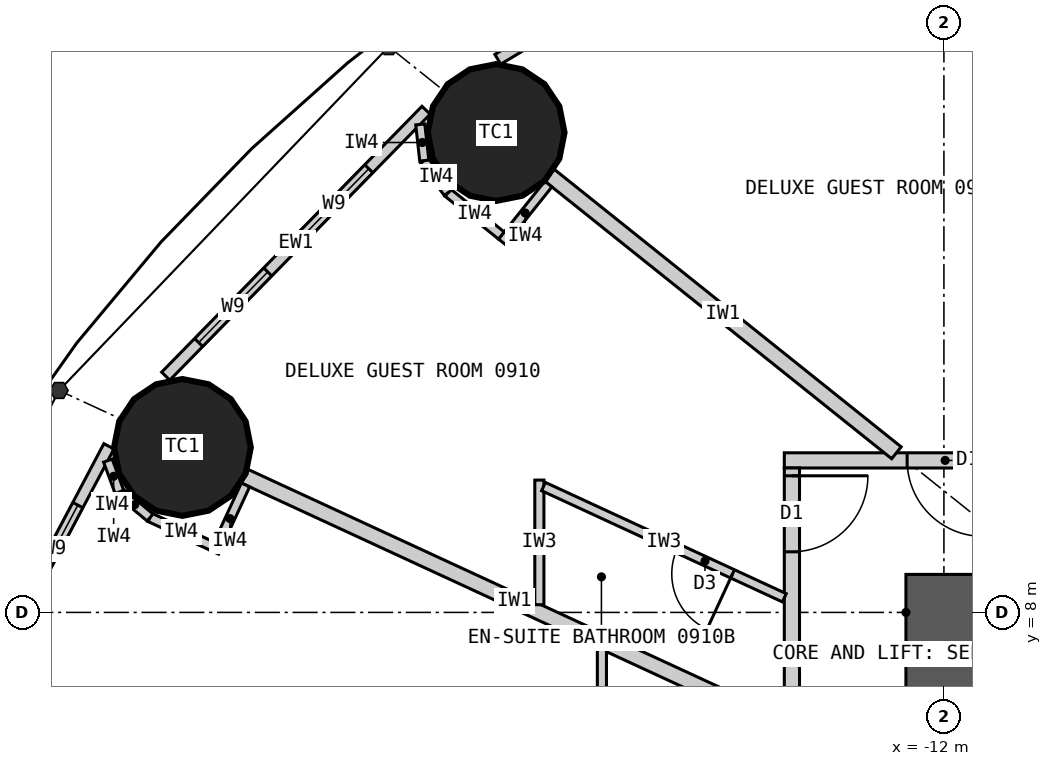
"""IFC4 building model, lengths in metres.
Left out: names, types, materials, properties, quantities, classifications, styles, units other than length and angle.
Written with IfcOpenShell. Run it as: python <this file> out.ifc"""

import sys

from ifc_helpers import new_model, si_unit, direction, frame, frame_2d, origin, origin_2d, place, context, subcontext, project, spatial, rectangle, circle, extrude, element, fill, save


model = new_model("IFC4")
c1 = context("Model", 3, precision=1e-05, world=origin(), true_north=direction((0.0, 1.0)))
c2 = subcontext(c1, "Body", "Model", "MODEL_VIEW")
j1 = project(units=[si_unit("LENGTHUNIT", "METRE"), si_unit("PLANEANGLEUNIT", "RADIAN")], contexts=[c1])
p1 = place(None, origin())
s1 = spatial("IfcSite", under=j1, at=p1, CompositionType="ELEMENT")
p2 = place(p1, origin())
s2 = spatial("IfcBuilding", under=s1, at=p2, CompositionType="ELEMENT")
p3 = place(p2, frame((0.0, 0.0, 42.6)))
s3 = spatial("IfcBuildingStorey", under=s2, at=p3, CompositionType="ELEMENT", Elevation=42.6)
for number, where, z_axis, x_axis in (
    (1, (-17.892, 14.313, 0.0), (0.0, 0.0, 1.0), (1.0, 0.0, 0.0)),
    (2, (-22.019, 10.17, 0.0), (0.0, 0.0, 1.0), (1.0, 0.0, 0.0)),
):
    element("IfcColumn", number, at=place(p3, frame(where, z_axis=z_axis, x_axis=x_axis)), inside=s3, PredefinedType="COLUMN", context=c2, shape_type="SweptSolid", body=[
        extrude(circle(Radius=0.9, at=origin_2d()), origin(), (0.0, 0.0, 1.0), 3.3),
    ])
p4 = place(p3, frame((-12.5, 8.0, 0.0), z_axis=(0.0, 0.0, 1.0), x_axis=(1.0, 0.0, 0.0)))
e3 = element("IfcWall", 3, at=p4, inside=s3, PredefinedType="SHEAR", context=c2, shape_type="SweptSolid", body=[
    extrude(rectangle(XDim=25.0, YDim=1.0, at=frame_2d((12.5, 0.0))), origin(), (0.0, 0.0, 1.0), 3.3),
])
p5 = place(p4, frame((11.2, 0.0, 0.0)))
e4 = element("IfcOpeningElement", 4, at=p5, cuts=e3, PredefinedType="OPENING", context=c2, shape_type="SweptSolid", body=[
    extrude(rectangle(XDim=1.2, YDim=2.2, at=frame_2d((0.6, 1.1))), frame((0.0, 0.51, 0.0), z_axis=(0.0, -1.0, 0.0), x_axis=(1.0, 0.0, 0.0)), (0.0, 0.0, 1.0), 1.02),
])
p6 = place(p4, frame((18.8, 0.0, 0.0)))
e5 = element("IfcOpeningElement", 5, at=p6, cuts=e3, PredefinedType="OPENING", context=c2, shape_type="SweptSolid", body=[
    extrude(rectangle(XDim=0.9, YDim=2.2, at=frame_2d((0.45, 1.1))), frame((0.0, 0.51, 0.0), z_axis=(0.0, -1.0, 0.0), x_axis=(1.0, 0.0, 0.0)), (0.0, 0.0, 1.0), 1.02),
])
p7 = place(p3, frame((-12.0, 7.5, 0.0), z_axis=(0.0, 0.0, 1.0), x_axis=(0.0, -1.0, 0.0)))
e6 = element("IfcWall", 6, at=p7, inside=s3, PredefinedType="SHEAR", context=c2, shape_type="SweptSolid", body=[
    extrude(rectangle(XDim=15.0, YDim=1.0, at=frame_2d((7.5, 0.0))), origin(), (0.0, 0.0, 1.0), 3.3),
])
p8 = place(p7, frame((6.6, 0.0, 0.0)))
e7 = element("IfcOpeningElement", 7, at=p8, cuts=e6, PredefinedType="OPENING", context=c2, shape_type="SweptSolid", body=[
    extrude(rectangle(XDim=1.8, YDim=2.2, at=frame_2d((0.9, 1.1))), frame((0.0, 0.51, 0.0), z_axis=(0.0, -1.0, 0.0), x_axis=(1.0, 0.0, 0.0)), (0.0, 0.0, 1.0), 1.02),
])
p9 = place(p3, frame((-13.412, 17.957, 0.0), z_axis=(0.0, 0.0, 1.0), x_axis=(-0.856958191554, -0.515385931054, 0.0)))
e8 = element("IfcWall", 8, at=p9, inside=s3, PredefinedType="ELEMENTEDWALL", context=c2, shape_type="SweptSolid", body=[
    extrude(rectangle(XDim=5.201, YDim=0.15, at=frame_2d((2.601, 0.0))), origin(), (0.0, 0.0, 1.0), 3.05),
])
p10 = place(p9, frame((1.225, 0.0, 0.9)))
e9 = element("IfcOpeningElement", 9, at=p10, cuts=e8, PredefinedType="OPENING", context=c2, shape_type="SweptSolid", body=[
    extrude(rectangle(XDim=1.3, YDim=1.9, at=frame_2d((0.65, 0.95))), frame((0.0, 0.085, 0.0), z_axis=(0.0, -1.0, 0.0), x_axis=(1.0, 0.0, 0.0)), (0.0, 0.0, 1.0), 0.17),
])
p11 = place(p9, frame((3.125, 0.0, 0.9)))
e10 = element("IfcOpeningElement", 10, at=p11, cuts=e8, PredefinedType="OPENING", context=c2, shape_type="SweptSolid", body=[
    extrude(rectangle(XDim=1.3, YDim=1.9, at=frame_2d((0.65, 0.95))), frame((0.0, 0.085, 0.0), z_axis=(0.0, -1.0, 0.0), x_axis=(1.0, 0.0, 0.0)), (0.0, 0.0, 1.0), 0.17),
])
p12 = place(p3, frame((-18.813, 14.607, 0.0), z_axis=(0.0, 0.0, 1.0), x_axis=(-0.699612594083, -0.714522370679, 0.0)))
e11 = element("IfcWall", 11, at=p12, inside=s3, PredefinedType="ELEMENTEDWALL", context=c2, shape_type="SweptSolid", body=[
    extrude(rectangle(XDim=4.896, YDim=0.15, at=frame_2d((2.448, 0.0))), origin(), (0.0, 0.0, 1.0), 3.05),
])
p13 = place(p12, frame((1.077, 0.0, 0.9)))
e12 = element("IfcOpeningElement", 12, at=p13, cuts=e11, PredefinedType="OPENING", context=c2, shape_type="SweptSolid", body=[
    extrude(rectangle(XDim=1.3, YDim=1.9, at=frame_2d((0.65, 0.95))), frame((0.0, 0.085, 0.0), z_axis=(0.0, -1.0, 0.0), x_axis=(1.0, 0.0, 0.0)), (0.0, 0.0, 1.0), 0.17),
])
p14 = place(p12, frame((2.977, 0.0, 0.9)))
e13 = element("IfcOpeningElement", 13, at=p14, cuts=e11, PredefinedType="OPENING", context=c2, shape_type="SweptSolid", body=[
    extrude(rectangle(XDim=1.3, YDim=1.9, at=frame_2d((0.65, 0.95))), frame((0.0, 0.085, 0.0), z_axis=(0.0, -1.0, 0.0), x_axis=(1.0, 0.0, 0.0)), (0.0, 0.0, 1.0), 0.17),
])
p15 = place(p3, frame((-22.986, 10.185, 0.0), z_axis=(0.0, 0.0, 1.0), x_axis=(-0.467303182954, -0.884097129959, 0.0)))
e14 = element("IfcWall", 14, at=p15, inside=s3, PredefinedType="ELEMENTEDWALL", context=c2, shape_type="SweptSolid", body=[
    extrude(rectangle(XDim=4.606, YDim=0.15, at=frame_2d((2.303, 0.0))), origin(), (0.0, 0.0, 1.0), 3.05),
])
p16 = place(p15, frame((0.875, 0.0, 0.9)))
e15 = element("IfcOpeningElement", 15, at=p16, cuts=e14, PredefinedType="OPENING", context=c2, shape_type="SweptSolid", body=[
    extrude(rectangle(XDim=1.3, YDim=1.9, at=frame_2d((0.65, 0.95))), frame((0.0, 0.085, 0.0), z_axis=(0.0, -1.0, 0.0), x_axis=(1.0, 0.0, 0.0)), (0.0, 0.0, 1.0), 0.17),
])
p17 = place(p15, frame((2.775, 0.0, 0.9)))
e16 = element("IfcOpeningElement", 16, at=p17, cuts=e14, PredefinedType="OPENING", context=c2, shape_type="SweptSolid", body=[
    extrude(rectangle(XDim=1.3, YDim=1.9, at=frame_2d((0.65, 0.95))), frame((0.0, 0.085, 0.0), z_axis=(0.0, -1.0, 0.0), x_axis=(1.0, 0.0, 0.0)), (0.0, 0.0, 1.0), 0.17),
])
p18 = place(p3, frame((-14.1, 10.0, 0.0), z_axis=(0.0, 0.0, 1.0), x_axis=(1.0, 0.0, 0.0)))
e17 = element("IfcWall", 17, at=p18, inside=s3, PredefinedType="PARTITIONING", context=c2, shape_type="SweptSolid", body=[
    extrude(rectangle(XDim=28.2, YDim=0.2, at=frame_2d((14.1, 0.0))), origin(), (0.0, 0.0, 1.0), 3.05),
])
p19 = place(p18, frame((23.477, 0.0, 0.0)))
e18 = element("IfcOpeningElement", 18, at=p19, cuts=e17, PredefinedType="OPENING", context=c2, shape_type="SweptSolid", body=[
    extrude(rectangle(XDim=1.0, YDim=2.2, at=frame_2d((0.5, 1.1))), frame((0.0, 0.11, 0.0), z_axis=(0.0, -1.0, 0.0), x_axis=(1.0, 0.0, 0.0)), (0.0, 0.0, 1.0), 0.22),
])
p20 = place(p18, frame((18.529, 0.0, 0.0)))
e19 = element("IfcOpeningElement", 19, at=p20, cuts=e17, PredefinedType="OPENING", context=c2, shape_type="SweptSolid", body=[
    extrude(rectangle(XDim=1.0, YDim=2.2, at=frame_2d((0.5, 1.1))), frame((0.0, 0.11, 0.0), z_axis=(0.0, -1.0, 0.0), x_axis=(1.0, 0.0, 0.0)), (0.0, 0.0, 1.0), 0.22),
])
p21 = place(p18, frame((14.623, 0.0, 0.0)))
e20 = element("IfcOpeningElement", 20, at=p21, cuts=e17, PredefinedType="OPENING", context=c2, shape_type="SweptSolid", body=[
    extrude(rectangle(XDim=1.0, YDim=2.2, at=frame_2d((0.5, 1.1))), frame((0.0, 0.11, 0.0), z_axis=(0.0, -1.0, 0.0), x_axis=(1.0, 0.0, 0.0)), (0.0, 0.0, 1.0), 0.22),
])
p22 = place(p18, frame((11.252, 0.0, 0.0)))
e21 = element("IfcOpeningElement", 21, at=p22, cuts=e17, PredefinedType="OPENING", context=c2, shape_type="SweptSolid", body=[
    extrude(rectangle(XDim=1.0, YDim=2.1, at=frame_2d((0.5, 1.05))), frame((0.0, 0.11, 0.0), z_axis=(0.0, -1.0, 0.0), x_axis=(1.0, 0.0, 0.0)), (0.0, 0.0, 1.0), 0.22),
])
p23 = place(p18, frame((8.671, 0.0, 0.0)))
e22 = element("IfcOpeningElement", 22, at=p23, cuts=e17, PredefinedType="OPENING", context=c2, shape_type="SweptSolid", body=[
    extrude(rectangle(XDim=1.0, YDim=2.2, at=frame_2d((0.5, 1.1))), frame((0.0, 0.11, 0.0), z_axis=(0.0, -1.0, 0.0), x_axis=(1.0, 0.0, 0.0)), (0.0, 0.0, 1.0), 0.22),
])
p24 = place(p18, frame((1.616, 0.0, 0.0)))
e23 = element("IfcOpeningElement", 23, at=p24, cuts=e17, PredefinedType="OPENING", context=c2, shape_type="SweptSolid", body=[
    extrude(rectangle(XDim=1.0, YDim=2.2, at=frame_2d((0.5, 1.1))), frame((0.0, 0.11, 0.0), z_axis=(0.0, -1.0, 0.0), x_axis=(1.0, 0.0, 0.0)), (0.0, 0.0, 1.0), 0.22),
])
p25 = place(p3, frame((-14.0, 9.9, 0.0), z_axis=(0.0, 0.0, 1.0), x_axis=(0.0, -1.0, 0.0)))
e24 = element("IfcWall", 24, at=p25, inside=s3, PredefinedType="PARTITIONING", context=c2, shape_type="SweptSolid", body=[
    extrude(rectangle(XDim=19.8, YDim=0.2, at=frame_2d((9.9, 0.0))), origin(), (0.0, 0.0, 1.0), 3.05),
])
p26 = place(p25, frame((0.103, 0.0, 0.0)))
e25 = element("IfcOpeningElement", 25, at=p26, cuts=e24, PredefinedType="OPENING", context=c2, shape_type="SweptSolid", body=[
    extrude(rectangle(XDim=1.0, YDim=2.2, at=frame_2d((0.5, 1.1))), frame((0.0, 0.11, 0.0), z_axis=(0.0, -1.0, 0.0), x_axis=(1.0, 0.0, 0.0)), (0.0, 0.0, 1.0), 0.22),
])
p27 = place(p25, frame((5.252, 0.0, 0.0)))
e26 = element("IfcOpeningElement", 26, at=p27, cuts=e24, PredefinedType="OPENING", context=c2, shape_type="SweptSolid", body=[
    extrude(rectangle(XDim=1.0, YDim=2.0, at=frame_2d((0.5, 1.0))), frame((0.0, 0.11, 0.0), z_axis=(0.0, -1.0, 0.0), x_axis=(1.0, 0.0, 0.0)), (0.0, 0.0, 1.0), 0.22),
])
p28 = place(p25, frame((10.117, 0.0, 0.0)))
e27 = element("IfcOpeningElement", 27, at=p28, cuts=e24, PredefinedType="OPENING", context=c2, shape_type="SweptSolid", body=[
    extrude(rectangle(XDim=1.0, YDim=2.2, at=frame_2d((0.5, 1.1))), frame((0.0, 0.11, 0.0), z_axis=(0.0, -1.0, 0.0), x_axis=(1.0, 0.0, 0.0)), (0.0, 0.0, 1.0), 0.22),
])
p29 = place(p25, frame((13.247, 0.0, 0.0)))
e28 = element("IfcOpeningElement", 28, at=p29, cuts=e24, PredefinedType="OPENING", context=c2, shape_type="SweptSolid", body=[
    extrude(rectangle(XDim=1.0, YDim=2.0, at=frame_2d((0.5, 1.0))), frame((0.0, 0.11, 0.0), z_axis=(0.0, -1.0, 0.0), x_axis=(1.0, 0.0, 0.0)), (0.0, 0.0, 1.0), 0.22),
])
p30 = place(p25, frame((15.679, 0.0, 0.0)))
e29 = element("IfcOpeningElement", 29, at=p30, cuts=e24, PredefinedType="OPENING", context=c2, shape_type="SweptSolid", body=[
    extrude(rectangle(XDim=1.0, YDim=2.2, at=frame_2d((0.5, 1.1))), frame((0.0, 0.11, 0.0), z_axis=(0.0, -1.0, 0.0), x_axis=(1.0, 0.0, 0.0)), (0.0, 0.0, 1.0), 0.22),
])
p31 = place(p3, frame((-7.289, 10.1, 0.0), z_axis=(0.0, 0.0, 1.0), x_axis=(-0.585216319319, 0.810877216108, 0.0)))
e30 = element("IfcWall", 30, at=p31, inside=s3, PredefinedType="PARTITIONING", context=c2, shape_type="SweptSolid", body=[
    extrude(rectangle(XDim=8.16, YDim=0.2, at=frame_2d((4.08, 0.0))), origin(), (0.0, 0.0, 1.0), 2.15),
])
p32 = place(p3, frame((-12.625, 10.1, 0.0), z_axis=(0.0, 0.0, 1.0), x_axis=(-0.780872884676, 0.624689953479, 0.0)))
e31 = element("IfcWall", 31, at=p32, inside=s3, PredefinedType="PARTITIONING", context=c2, shape_type="SweptSolid", body=[
    extrude(rectangle(XDim=5.845, YDim=0.2, at=frame_2d((2.922, 0.0))), origin(), (0.0, 0.0, 1.0), 2.15),
])
p33 = place(p3, frame((-14.1, 6.512, 0.0), z_axis=(0.0, 0.0, 1.0), x_axis=(-0.907842433118, 0.41931147925, 0.0)))
e32 = element("IfcWall", 32, at=p33, inside=s3, PredefinedType="PARTITIONING", context=c2, shape_type="SweptSolid", body=[
    extrude(rectangle(XDim=7.823, YDim=0.2, at=frame_2d((3.912, 0.0))), origin(), (0.0, 0.0, 1.0), 2.15),
])
p34 = place(p3, frame((-17.323, 8.101, 0.0), z_axis=(0.0, 0.0, 1.0), x_axis=(0.0, 1.0, 0.0)))
e33 = element("IfcWall", 33, at=p34, inside=s3, PredefinedType="PARTITIONING", context=c2, shape_type="SweptSolid", body=[
    extrude(rectangle(XDim=1.64, YDim=0.12, at=frame_2d((0.82, 0.0))), origin(), (0.0, 0.0, 1.0), 3.05),
])
p35 = place(p3, frame((-14.1, 8.193, 0.0), z_axis=(0.0, 0.0, 1.0), x_axis=(-0.907836493557, 0.419324338628, 0.0)))
e34 = element("IfcWall", 34, at=p35, inside=s3, PredefinedType="PARTITIONING", context=c2, shape_type="SweptSolid", body=[
    extrude(rectangle(XDim=3.49, YDim=0.12, at=frame_2d((1.745, 0.0))), origin(), (0.0, 0.0, 1.0), 3.05),
])
p36 = place(p35, frame((0.75, 0.0, 0.0)))
e35 = element("IfcOpeningElement", 35, at=p36, cuts=e34, PredefinedType="OPENING", context=c2, shape_type="SweptSolid", body=[
    extrude(rectangle(XDim=0.8, YDim=2.1, at=frame_2d((0.4, 1.05))), frame((0.0, 0.07, 0.0), z_axis=(0.0, -1.0, 0.0), x_axis=(1.0, 0.0, 0.0)), (0.0, 0.0, 1.0), 0.14),
])
p37 = place(p3, frame((-16.5, 7.521, 0.0), z_axis=(0.0, 0.0, 1.0), x_axis=(0.0, -1.0, 0.0)))
e36 = element("IfcWall", 36, at=p37, inside=s3, PredefinedType="PARTITIONING", context=c2, shape_type="SweptSolid", body=[
    extrude(rectangle(XDim=2.749, YDim=0.12, at=frame_2d((1.374, 0.0))), origin(), (0.0, 0.0, 1.0), 3.05),
])
p38 = place(p3, frame((-17.205, 13.635, 0.0), z_axis=(0.0, 0.0, 1.0), x_axis=(-0.624756144097, -0.780819928289, 0.0)))
e37 = element("IfcWall", 37, at=p38, inside=s3, PredefinedType="PARTITIONING", context=c2, shape_type="SweptSolid", body=[
    extrude(rectangle(XDim=0.975, YDim=0.12, at=frame_2d((0.487, 0.0))), origin(), (0.0, 0.0, 1.0), 3.05),
])
p39 = place(p3, frame((-17.823, 12.959, 0.0), z_axis=(0.0, 0.0, 1.0), x_axis=(-0.780895271023, 0.624661969144, 0.0)))
e38 = element("IfcWall", 38, at=p39, inside=s3, PredefinedType="PARTITIONING", context=c2, shape_type="SweptSolid", body=[
    extrude(rectangle(XDim=0.9, YDim=0.12, at=frame_2d((0.45, 0.0))), origin(), (0.0, 0.0, 1.0), 3.05),
])
p40 = place(p3, frame((-18.526, 13.521, 0.0), z_axis=(0.0, 0.0, 1.0), x_axis=(-0.592532503205, 0.805546542818, 0.0)))
e39 = element("IfcWall", 39, at=p40, inside=s3, PredefinedType="PARTITIONING", context=c2, shape_type="SweptSolid", body=[
    extrude(rectangle(XDim=0.525, YDim=0.12, at=frame_2d((0.262, 0.0))), origin(), (0.0, 0.0, 1.0), 3.05),
])
p41 = place(p3, frame((-18.837, 13.944, 0.0), z_axis=(0.0, 0.0, 1.0), x_axis=(-0.110543348478, 0.993871303594, 0.0)))
e40 = element("IfcWall", 40, at=p41, inside=s3, PredefinedType="PARTITIONING", context=c2, shape_type="SweptSolid", body=[
    extrude(rectangle(XDim=0.479, YDim=0.12, at=frame_2d((0.24, 0.0))), origin(), (0.0, 0.0, 1.0), 3.05),
])
p42 = place(p3, frame((-21.189, 9.677, 0.0), z_axis=(0.0, 0.0, 1.0), x_axis=(-0.419344098106, -0.907827366509, 0.0)))
e41 = element("IfcWall", 41, at=p42, inside=s3, PredefinedType="PARTITIONING", context=c2, shape_type="SweptSolid", body=[
    extrude(rectangle(XDim=0.975, YDim=0.12, at=frame_2d((0.487, 0.0))), origin(), (0.0, 0.0, 1.0), 3.05),
])
p43 = place(p3, frame((-21.627, 8.872, 0.0), z_axis=(0.0, 0.0, 1.0), x_axis=(-0.907935564339, 0.419109783957, 0.0)))
e42 = element("IfcWall", 42, at=p43, inside=s3, PredefinedType="PARTITIONING", context=c2, shape_type="SweptSolid", body=[
    extrude(rectangle(XDim=0.9, YDim=0.12, at=frame_2d((0.45, 0.0))), origin(), (0.0, 0.0, 1.0), 3.05),
])
p44 = place(p3, frame((-22.445, 9.249, 0.0), z_axis=(0.0, 0.0, 1.0), x_axis=(-0.768335565584, 0.640047231584, 0.0)))
e43 = element("IfcWall", 43, at=p44, inside=s3, PredefinedType="PARTITIONING", context=c2, shape_type="SweptSolid", body=[
    extrude(rectangle(XDim=0.525, YDim=0.12, at=frame_2d((0.263, 0.0))), origin(), (0.0, 0.0, 1.0), 3.05),
])
p45 = place(p3, frame((-22.848, 9.585, 0.0), z_axis=(0.0, 0.0, 1.0), x_axis=(-0.345267312673, 0.938504386138, 0.0)))
e44 = element("IfcWall", 44, at=p45, inside=s3, PredefinedType="PARTITIONING", context=c2, shape_type="SweptSolid", body=[
    extrude(rectangle(XDim=0.439, YDim=0.12, at=frame_2d((0.22, 0.0))), origin(), (0.0, 0.0, 1.0), 3.05),
])
p46 = place(p13, origin())
e45 = element("IfcWindow", 45, at=p46, inside=s3, PartitioningType="SINGLE_PANEL", PredefinedType="WINDOW", context=c2, shape_type="SweptSolid", body=[
    extrude(rectangle(XDim=1.3, YDim=1.9, at=frame_2d((0.65, 0.95))), frame((0.0, 0.03, 0.0), z_axis=(0.0, -1.0, 0.0), x_axis=(1.0, 0.0, 0.0)), (0.0, 0.0, 1.0), 0.06),
])
fill(e12, e45)
p47 = place(p14, origin())
e46 = element("IfcWindow", 46, at=p47, inside=s3, PartitioningType="SINGLE_PANEL", PredefinedType="WINDOW", context=c2, shape_type="SweptSolid", body=[
    extrude(rectangle(XDim=1.3, YDim=1.9, at=frame_2d((0.65, 0.95))), frame((0.0, 0.03, 0.0), z_axis=(0.0, -1.0, 0.0), x_axis=(1.0, 0.0, 0.0)), (0.0, 0.0, 1.0), 0.06),
])
fill(e13, e46)
p48 = place(p16, origin())
e47 = element("IfcWindow", 47, at=p48, inside=s3, PartitioningType="SINGLE_PANEL", PredefinedType="WINDOW", context=c2, shape_type="SweptSolid", body=[
    extrude(rectangle(XDim=1.3, YDim=1.9, at=frame_2d((0.65, 0.95))), frame((0.0, 0.03, 0.0), z_axis=(0.0, -1.0, 0.0), x_axis=(1.0, 0.0, 0.0)), (0.0, 0.0, 1.0), 0.06),
])
fill(e15, e47)
p49 = place(p24, origin())
e48 = element("IfcDoor", 48, at=p49, inside=s3, OperationType="SINGLE_SWING_RIGHT", PredefinedType="DOOR", context=c2, shape_type="SweptSolid", body=[
    extrude(rectangle(XDim=1.0, YDim=2.2, at=frame_2d((0.5, 1.1))), frame((0.0, 0.025, 0.0), z_axis=(0.0, -1.0, 0.0), x_axis=(1.0, 0.0, 0.0)), (0.0, 0.0, 1.0), 0.05),
])
fill(e23, e48)
p50 = place(p36, origin())
e49 = element("IfcDoor", 49, at=p50, inside=s3, OperationType="SINGLE_SWING_LEFT", PredefinedType="DOOR", context=c2, shape_type="SweptSolid", body=[
    extrude(rectangle(XDim=0.8, YDim=2.1, at=frame_2d((0.4, 1.05))), frame((0.0, 0.025, 0.0), z_axis=(0.0, -1.0, 0.0), x_axis=(1.0, 0.0, 0.0)), (0.0, 0.0, 1.0), 0.05),
])
fill(e35, e49)
p51 = place(p26, origin())
e50 = element("IfcDoor", 50, at=p51, inside=s3, OperationType="SINGLE_SWING_LEFT", PredefinedType="DOOR", context=c2, shape_type="SweptSolid", body=[
    extrude(rectangle(XDim=1.0, YDim=2.2, at=frame_2d((0.5, 1.1))), frame((0.0, 0.025, 0.0), z_axis=(0.0, -1.0, 0.0), x_axis=(1.0, 0.0, 0.0)), (0.0, 0.0, 1.0), 0.05),
])
fill(e25, e50)
save(model, sys.argv[1])
